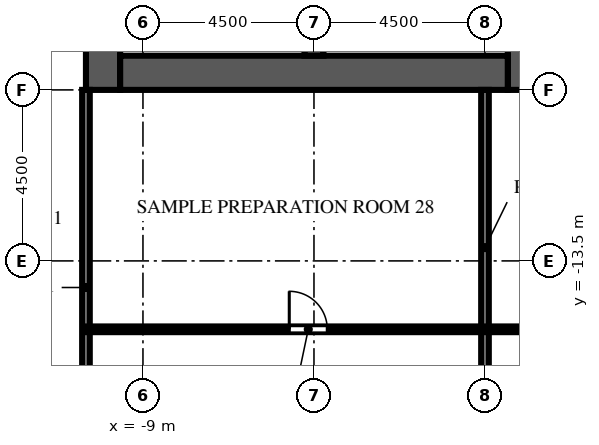
"""IFC4 building model, lengths in metres.
Left out: names, types, materials, properties, quantities, classifications, styles, units other than length and angle.
Written with IfcOpenShell. Run it as: python <this file> out.ifc"""

import sys

from ifc_helpers import new_model, si_unit, direction, frame, frame_2d, origin, place, context, subcontext, project, spatial, rectangle, extrude, element, fill, save


model = new_model("IFC4")
c1 = context("Model", 3, precision=1e-05, world=origin(), true_north=direction((0.0, 1.0)))
c2 = subcontext(c1, "Body", "Model", "MODEL_VIEW")
j1 = project(units=[si_unit("LENGTHUNIT", "METRE"), si_unit("PLANEANGLEUNIT", "RADIAN")], contexts=[c1])
p1 = place(None, origin())
s1 = spatial("IfcSite", under=j1, at=p1, CompositionType="ELEMENT")
p2 = place(p1, origin())
s2 = spatial("IfcBuilding", under=s1, at=p2, CompositionType="ELEMENT")
p3 = place(p2, frame((0.0, 0.0, 90.2)))
s3 = spatial("IfcBuildingStorey", under=s2, at=p3, CompositionType="ELEMENT", Elevation=90.2)
p4 = place(p3, frame((-10.05, -9.0, 0.0), z_axis=(0.0, 0.0, 1.0), x_axis=(0.0, 1.0, 0.0)))
e1 = element("IfcWall", 1, at=p4, inside=s3, PredefinedType="SHEAR", context=c2, shape_type="SweptSolid", body=[
    extrude(rectangle(XDim=27.5, YDim=0.9, at=frame_2d((13.75, 0.0))), origin(), (0.0, 0.0, 1.0), 4.1),
])
p5 = place(p4, frame((12.55, 0.0, 0.0)))
e2 = element("IfcOpeningElement", 2, at=p5, cuts=e1, PredefinedType="OPENING", context=c2, shape_type="SweptSolid", body=[
    extrude(rectangle(XDim=2.4, YDim=2.4, at=frame_2d((1.2, 1.2))), frame((0.0, 0.46, 0.0), z_axis=(0.0, -1.0, 0.0), x_axis=(1.0, 0.0, 0.0)), (0.0, 0.0, 1.0), 0.92),
])
p6 = place(p4, frame((6.825, 0.0, 0.0)))
e3 = element("IfcOpeningElement", 3, at=p6, cuts=e1, PredefinedType="OPENING", context=c2, shape_type="SweptSolid", body=[
    extrude(rectangle(XDim=1.2, YDim=2.1, at=frame_2d((0.6, 1.05))), frame((0.0, 0.46, 0.0), z_axis=(0.0, -1.0, 0.0), x_axis=(1.0, 0.0, 0.0)), (0.0, 0.0, 1.0), 0.92),
])
p7 = place(p4, frame((19.475, 0.0, 0.0)))
e4 = element("IfcOpeningElement", 4, at=p7, cuts=e1, PredefinedType="OPENING", context=c2, shape_type="SweptSolid", body=[
    extrude(rectangle(XDim=1.2, YDim=2.1, at=frame_2d((0.6, 1.05))), frame((0.0, 0.46, 0.0), z_axis=(0.0, -1.0, 0.0), x_axis=(1.0, 0.0, 0.0)), (0.0, 0.0, 1.0), 0.92),
])
p8 = place(p3, frame((1.05, -9.0, 0.0), z_axis=(0.0, 0.0, 1.0), x_axis=(0.0, 1.0, 0.0)))
e5 = element("IfcWall", 5, at=p8, inside=s3, PredefinedType="SHEAR", context=c2, shape_type="SweptSolid", body=[
    extrude(rectangle(XDim=27.5, YDim=0.9, at=frame_2d((13.75, 0.0))), origin(), (0.0, 0.0, 1.0), 4.1),
])
p9 = place(p8, frame((12.55, 0.0, 0.0)))
e6 = element("IfcOpeningElement", 6, at=p9, cuts=e5, PredefinedType="OPENING", context=c2, shape_type="SweptSolid", body=[
    extrude(rectangle(XDim=2.4, YDim=2.4, at=frame_2d((1.2, 1.2))), frame((0.0, 0.46, 0.0), z_axis=(0.0, -1.0, 0.0), x_axis=(1.0, 0.0, 0.0)), (0.0, 0.0, 1.0), 0.92),
])
p10 = place(p8, frame((3.975, 0.0, 0.0)))
e7 = element("IfcOpeningElement", 7, at=p10, cuts=e5, PredefinedType="OPENING", context=c2, shape_type="SweptSolid", body=[
    extrude(rectangle(XDim=1.2, YDim=2.1, at=frame_2d((0.6, 1.05))), frame((0.0, 0.46, 0.0), z_axis=(0.0, -1.0, 0.0), x_axis=(1.0, 0.0, 0.0)), (0.0, 0.0, 1.0), 0.92),
])
p11 = place(p8, frame((22.325, 0.0, 0.0)))
e8 = element("IfcOpeningElement", 8, at=p11, cuts=e5, PredefinedType="OPENING", context=c2, shape_type="SweptSolid", body=[
    extrude(rectangle(XDim=1.2, YDim=2.1, at=frame_2d((0.6, 1.05))), frame((0.0, 0.46, 0.0), z_axis=(0.0, -1.0, 0.0), x_axis=(1.0, 0.0, 0.0)), (0.0, 0.0, 1.0), 0.92),
])
p12 = place(p3, frame((-9.6, -8.55, 0.0), z_axis=(0.0, 0.0, 1.0), x_axis=(1.0, 0.0, 0.0)))
e9 = element("IfcWall", 9, at=p12, inside=s3, PredefinedType="SHEAR", context=c2, shape_type="SweptSolid", body=[
    extrude(rectangle(XDim=10.2, YDim=0.9, at=frame_2d((5.1, 0.0))), origin(), (0.0, 0.0, 1.0), 4.1),
])
p13 = place(p3, frame((-4.5, -8.1, 0.0), z_axis=(0.0, 0.0, 1.0), x_axis=(0.0, 1.0, 0.0)))
e10 = element("IfcWall", 10, at=p13, inside=s3, PredefinedType="SHEAR", context=c2, shape_type="SweptSolid", body=[
    extrude(rectangle(XDim=7.35, YDim=0.5, at=frame_2d((3.675, 0.0))), origin(), (0.0, 0.0, 1.0), 4.1),
])
p14 = place(p3, frame((-0.9, -8.1, 0.0), z_axis=(0.0, 0.0, 1.0), x_axis=(0.0, 1.0, 0.0)))
e11 = element("IfcWall", 11, at=p14, inside=s3, PredefinedType="PARTITIONING", context=c2, shape_type="SweptSolid", body=[
    extrude(rectangle(XDim=2.499, YDim=0.1, at=frame_2d((1.25, 0.0))), origin(), (0.0, 0.0, 1.0), 3.65),
])
p15 = place(p14, frame((0.75, 0.0, 0.0)))
e12 = element("IfcOpeningElement", 12, at=p15, cuts=e11, PredefinedType="OPENING", context=c2, shape_type="SweptSolid", body=[
    extrude(rectangle(XDim=1.0, YDim=2.1, at=frame_2d((0.5, 1.05))), frame((0.0, 0.06, 0.0), z_axis=(0.0, -1.0, 0.0), x_axis=(1.0, 0.0, 0.0)), (0.0, 0.0, 1.0), 0.12),
])
p16 = place(p3, frame((-10.5, -9.0, 0.0), z_axis=(0.0, 0.0, 1.0), x_axis=(0.0, -1.0, 0.0)))
e13 = element("IfcWall", 13, at=p16, inside=s3, PredefinedType="PARTITIONING", context=c2, shape_type="SweptSolid", body=[
    extrude(rectangle(XDim=13.35, YDim=0.2, at=frame_2d((6.675, 0.0))), origin(), (0.0, 0.0, 1.0), 3.65),
])
p17 = place(p16, frame((10.4, 0.0, 0.0)))
e14 = element("IfcOpeningElement", 14, at=p17, cuts=e13, PredefinedType="OPENING", context=c2, shape_type="SweptSolid", body=[
    extrude(rectangle(XDim=1.0, YDim=2.1, at=frame_2d((0.5, 1.05))), frame((0.0, 0.11, 0.0), z_axis=(0.0, -1.0, 0.0), x_axis=(1.0, 0.0, 0.0)), (0.0, 0.0, 1.0), 0.22),
])
p18 = place(p3, frame((0.0, -17.3, 0.0), z_axis=(0.0, 0.0, 1.0), x_axis=(0.0, 1.0, 0.0)))
e15 = element("IfcWall", 15, at=p18, inside=s3, PredefinedType="PARTITIONING", context=c2, shape_type="SweptSolid", body=[
    extrude(rectangle(XDim=8.3, YDim=0.2, at=frame_2d((4.15, 0.0))), origin(), (0.0, 0.0, 1.0), 3.65),
])
p19 = place(p3, frame((-10.5, -15.3, 0.0), z_axis=(0.0, 0.0, 1.0), x_axis=(1.0, 0.0, 0.0)))
e16 = element("IfcWall", 16, at=p19, inside=s3, PredefinedType="PARTITIONING", context=c2, shape_type="SweptSolid", body=[
    extrude(rectangle(XDim=28.5, YDim=0.15, at=frame_2d((14.25, 0.0))), origin(), (0.0, 0.0, 1.0), 3.65),
])
p20 = place(p19, frame((5.35, 0.0, 0.0)))
e17 = element("IfcOpeningElement", 17, at=p20, cuts=e16, PredefinedType="OPENING", context=c2, shape_type="SweptSolid", body=[
    extrude(rectangle(XDim=1.0, YDim=2.1, at=frame_2d((0.5, 1.05))), frame((0.0, 0.085, 0.0), z_axis=(0.0, -1.0, 0.0), x_axis=(1.0, 0.0, 0.0)), (0.0, 0.0, 1.0), 0.17),
])
p21 = place(p19, frame((18.1, 0.0, 0.0)))
e18 = element("IfcOpeningElement", 18, at=p21, cuts=e16, PredefinedType="OPENING", context=c2, shape_type="SweptSolid", body=[
    extrude(rectangle(XDim=1.0, YDim=2.1, at=frame_2d((0.5, 1.05))), frame((0.0, 0.085, 0.0), z_axis=(0.0, -1.0, 0.0), x_axis=(1.0, 0.0, 0.0)), (0.0, 0.0, 1.0), 0.17),
])
p22 = place(p19, frame((26.1, 0.0, 0.0)))
e19 = element("IfcOpeningElement", 19, at=p22, cuts=e16, PredefinedType="OPENING", context=c2, shape_type="SweptSolid", body=[
    extrude(rectangle(XDim=1.0, YDim=2.1, at=frame_2d((0.5, 1.05))), frame((0.0, 0.085, 0.0), z_axis=(0.0, -1.0, 0.0), x_axis=(1.0, 0.0, 0.0)), (0.0, 0.0, 1.0), 0.17),
])
p23 = place(p20, origin())
e20 = element("IfcDoor", 20, at=p23, inside=s3, OperationType="SINGLE_SWING_LEFT", PredefinedType="DOOR", context=c2, shape_type="SweptSolid", body=[
    extrude(rectangle(XDim=1.0, YDim=2.1, at=frame_2d((0.5, 1.05))), frame((0.0, 0.025, 0.0), z_axis=(0.0, -1.0, 0.0), x_axis=(1.0, 0.0, 0.0)), (0.0, 0.0, 1.0), 0.05),
])
fill(e17, e20)
save(model, sys.argv[1])
